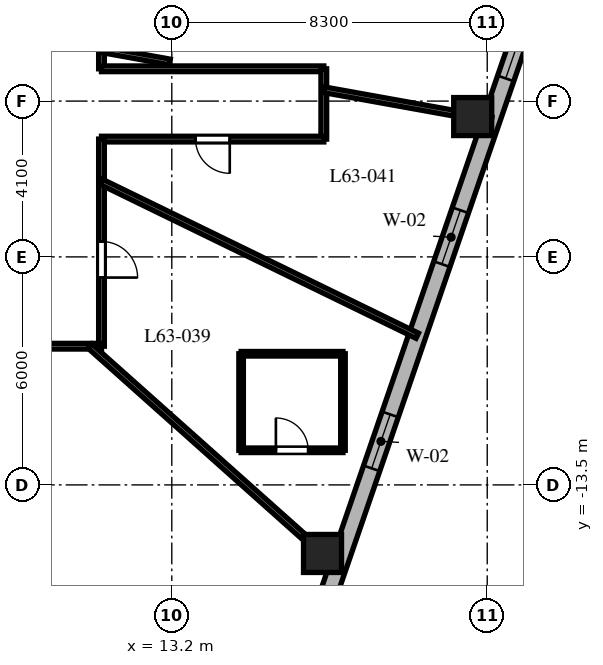
"""IFC4 building model, lengths in metres.
Left out: names, types, materials, properties, quantities, classifications, styles, units other than length and angle.
Written with IfcOpenShell. Run it as: python <this file> out.ifc"""

import sys

from ifc_helpers import new_model, si_unit, direction, frame, frame_2d, origin, origin_2d, place, context, subcontext, project, spatial, rectangle, extrude, element, fill, save


model = new_model("IFC4")
c1 = context("Model", 3, precision=1e-05, world=origin(), true_north=direction((0.0, 1.0)))
c2 = subcontext(c1, "Body", "Model", "MODEL_VIEW")
j1 = project(units=[si_unit("LENGTHUNIT", "METRE"), si_unit("PLANEANGLEUNIT", "RADIAN")], contexts=[c1])
p1 = place(None, origin())
s1 = spatial("IfcSite", under=j1, at=p1, CompositionType="ELEMENT")
p2 = place(p1, origin())
s2 = spatial("IfcBuilding", under=s1, at=p2, CompositionType="ELEMENT")
p3 = place(p2, frame((0.0, 0.0, 252.1)))
s3 = spatial("IfcBuildingStorey", under=s2, at=p3, CompositionType="ELEMENT", Elevation=252.1)
for number, where, z_axis, x_axis in (
    (1, (17.166, -15.304, 0.0), (0.0, 0.0, 1.0), (1.0, 0.0, 0.0)),
    (2, (21.118, -3.807, 0.0), (0.0, 0.0, 1.0), (1.0, 0.0, 0.0)),
):
    element("IfcColumn", number, at=place(p3, frame(where, z_axis=z_axis, x_axis=x_axis)), inside=s3, PredefinedType="COLUMN", context=c2, shape_type="SweptSolid", body=[
        extrude(rectangle(XDim=1.0, YDim=1.0, at=origin_2d()), origin(), (0.0, 0.0, 1.0), 3.8),
    ])
p4 = place(p3, frame((16.324, -19.275, 0.0), z_axis=(0.0, 0.0, 1.0), x_axis=(0.325083142304, 0.945685439557, 0.0)))
e3 = element("IfcWall", 3, at=p4, inside=s3, PredefinedType="SOLIDWALL", context=c2, shape_type="SweptSolid", body=[
    extrude(rectangle(XDim=20.224, YDim=0.45, at=frame_2d((10.112, 0.0))), origin(), (0.0, 0.0, 1.0), 3.48),
])
p5 = place(p4, frame((1.253, 0.0, 0.8)))
e4 = element("IfcOpeningElement", 4, at=p5, cuts=e3, PredefinedType="OPENING", context=c2, shape_type="SweptSolid", body=[
    extrude(rectangle(XDim=1.5, YDim=1.8, at=frame_2d((0.75, 0.9))), frame((0.0, 0.235, 0.0), z_axis=(0.0, -1.0, 0.0), x_axis=(1.0, 0.0, 0.0)), (0.0, 0.0, 1.0), 0.47),
])
p6 = place(p4, frame((6.568, 0.0, 0.8)))
e5 = element("IfcOpeningElement", 5, at=p6, cuts=e3, PredefinedType="OPENING", context=c2, shape_type="SweptSolid", body=[
    extrude(rectangle(XDim=1.5, YDim=1.8, at=frame_2d((0.75, 0.9))), frame((0.0, 0.235, 0.0), z_axis=(0.0, -1.0, 0.0), x_axis=(1.0, 0.0, 0.0)), (0.0, 0.0, 1.0), 0.47),
])
p7 = place(p4, frame((12.25, 0.0, 0.8)))
e6 = element("IfcOpeningElement", 6, at=p7, cuts=e3, PredefinedType="OPENING", context=c2, shape_type="SweptSolid", body=[
    extrude(rectangle(XDim=1.5, YDim=1.8, at=frame_2d((0.75, 0.9))), frame((0.0, 0.235, 0.0), z_axis=(0.0, -1.0, 0.0), x_axis=(1.0, 0.0, 0.0)), (0.0, 0.0, 1.0), 0.47),
])
p8 = place(p4, frame((17.418, 0.0, 0.8)))
e7 = element("IfcOpeningElement", 7, at=p8, cuts=e3, PredefinedType="OPENING", context=c2, shape_type="SweptSolid", body=[
    extrude(rectangle(XDim=1.5, YDim=1.8, at=frame_2d((0.75, 0.9))), frame((0.0, 0.235, 0.0), z_axis=(0.0, -1.0, 0.0), x_axis=(1.0, 0.0, 0.0)), (0.0, 0.0, 1.0), 0.47),
])
p9 = place(p3, frame((11.35, 9.85, 0.0), z_axis=(0.0, 0.0, 1.0), x_axis=(0.0, -1.0, 0.0)))
e8 = element("IfcWall", 8, at=p9, inside=s3, PredefinedType="PARTITIONING", context=c2, shape_type="SweptSolid", body=[
    extrude(rectangle(XDim=12.4, YDim=0.15, at=frame_2d((6.2, 0.0))), origin(), (0.0, 0.0, 1.0), 2.97),
])
p10 = place(p9, frame((4.709, 0.0, 0.0)))
e9 = element("IfcOpeningElement", 9, at=p10, cuts=e8, PredefinedType="OPENING", context=c2, shape_type="SweptSolid", body=[
    extrude(rectangle(XDim=0.9, YDim=2.03, at=frame_2d((0.45, 1.015))), frame((0.0, 0.085, 0.0), z_axis=(0.0, -1.0, 0.0), x_axis=(1.0, 0.0, 0.0)), (0.0, 0.0, 1.0), 0.17),
])
p11 = place(p9, frame((1.457, 0.0, 0.0)))
e10 = element("IfcOpeningElement", 10, at=p11, cuts=e8, PredefinedType="OPENING", context=c2, shape_type="SweptSolid", body=[
    extrude(rectangle(XDim=0.95, YDim=2.03, at=frame_2d((0.475, 1.015))), frame((0.0, 0.085, 0.0), z_axis=(0.0, -1.0, 0.0), x_axis=(1.0, 0.0, 0.0)), (0.0, 0.0, 1.0), 0.17),
])
p12 = place(p9, frame((8.835, 0.0, 0.0)))
e11 = element("IfcOpeningElement", 11, at=p12, cuts=e8, PredefinedType="OPENING", context=c2, shape_type="SweptSolid", body=[
    extrude(rectangle(XDim=0.95, YDim=2.03, at=frame_2d((0.475, 1.015))), frame((0.0, 0.085, 0.0), z_axis=(0.0, -1.0, 0.0), x_axis=(1.0, 0.0, 0.0)), (0.0, 0.0, 1.0), 0.17),
])
p13 = place(p3, frame((11.35, -2.55, 0.0), z_axis=(0.0, 0.0, 1.0), x_axis=(1.0, 0.0, 0.0)))
e12 = element("IfcWall", 12, at=p13, inside=s3, PredefinedType="PARTITIONING", context=c2, shape_type="SweptSolid", body=[
    extrude(rectangle(XDim=5.85, YDim=0.15, at=frame_2d((2.925, 0.0))), origin(), (0.0, 0.0, 1.0), 2.92),
])
p14 = place(p3, frame((17.2, -2.55, 0.0), z_axis=(0.0, 0.0, 1.0), x_axis=(0.0, -1.0, 0.0)))
e13 = element("IfcWall", 13, at=p14, inside=s3, PredefinedType="PARTITIONING", context=c2, shape_type="SweptSolid", body=[
    extrude(rectangle(XDim=1.85, YDim=0.15, at=frame_2d((0.925, 0.0))), origin(), (0.0, 0.0, 1.0), 2.92),
])
p15 = place(p3, frame((17.2, -4.4, 0.0), z_axis=(0.0, 0.0, 1.0), x_axis=(-1.0, 0.0, 0.0)))
e14 = element("IfcWall", 14, at=p15, inside=s3, PredefinedType="PARTITIONING", context=c2, shape_type="SweptSolid", body=[
    extrude(rectangle(XDim=5.85, YDim=0.15, at=frame_2d((2.925, 0.0))), origin(), (0.0, 0.0, 1.0), 2.92),
])
p16 = place(p15, frame((2.475, 0.0, 0.0)))
e15 = element("IfcOpeningElement", 15, at=p16, cuts=e14, PredefinedType="OPENING", context=c2, shape_type="SweptSolid", body=[
    extrude(rectangle(XDim=0.9, YDim=2.03, at=frame_2d((0.45, 1.015))), frame((0.0, 0.085, 0.0), z_axis=(0.0, -1.0, 0.0), x_axis=(1.0, 0.0, 0.0)), (0.0, 0.0, 1.0), 0.17),
])
p17 = place(p3, frame((11.35, -4.4, 0.0), z_axis=(0.0, 0.0, 1.0), x_axis=(0.0, -1.0, 0.0)))
e16 = element("IfcWall", 16, at=p17, inside=s3, PredefinedType="PARTITIONING", context=c2, shape_type="SweptSolid", body=[
    extrude(rectangle(XDim=5.45, YDim=0.15, at=frame_2d((2.725, 0.0))), origin(), (0.0, 0.0, 1.0), 2.97),
])
p18 = place(p17, frame((2.694, 0.0, 0.0)))
e17 = element("IfcOpeningElement", 17, at=p18, cuts=e16, PredefinedType="OPENING", context=c2, shape_type="SweptSolid", body=[
    extrude(rectangle(XDim=0.95, YDim=2.03, at=frame_2d((0.475, 1.015))), frame((0.0, 0.085, 0.0), z_axis=(0.0, -1.0, 0.0), x_axis=(1.0, 0.0, 0.0)), (0.0, 0.0, 1.0), 0.17),
])
p19 = place(p3, frame((11.35, -9.85, 0.0), z_axis=(0.0, 0.0, 1.0), x_axis=(-1.0, 0.0, 0.0)))
e18 = element("IfcWall", 18, at=p19, inside=s3, PredefinedType="PARTITIONING", context=c2, shape_type="SweptSolid", body=[
    extrude(rectangle(XDim=10.43, YDim=0.15, at=frame_2d((5.215, 0.0))), origin(), (0.0, 0.0, 1.0), 2.97),
])
p20 = place(p19, frame((8.362, 0.0, 0.0)))
e19 = element("IfcOpeningElement", 19, at=p20, cuts=e18, PredefinedType="OPENING", context=c2, shape_type="SweptSolid", body=[
    extrude(rectangle(XDim=0.95, YDim=2.03, at=frame_2d((0.475, 1.015))), frame((0.0, 0.085, 0.0), z_axis=(0.0, -1.0, 0.0), x_axis=(1.0, 0.0, 0.0)), (0.0, 0.0, 1.0), 0.17),
])
p21 = place(p19, frame((3.396, 0.0, 0.0)))
e20 = element("IfcOpeningElement", 20, at=p21, cuts=e18, PredefinedType="OPENING", context=c2, shape_type="SweptSolid", body=[
    extrude(rectangle(XDim=0.95, YDim=2.03, at=frame_2d((0.475, 1.015))), frame((0.0, 0.085, 0.0), z_axis=(0.0, -1.0, 0.0), x_axis=(1.0, 0.0, 0.0)), (0.0, 0.0, 1.0), 0.17),
])
p22 = place(p3, frame((11.048, -9.85, 0.0), z_axis=(0.0, 0.0, 1.0), x_axis=(0.746444434655, -0.665447748492, 0.0)))
e21 = element("IfcWall", 21, at=p22, inside=s3, PredefinedType="PARTITIONING", context=c2, shape_type="SweptSolid", body=[
    extrude(rectangle(XDim=8.732, YDim=0.15, at=frame_2d((4.366, 0.0))), origin(), (0.0, 0.0, 1.0), 2.72),
])
p23 = place(p3, frame((11.35, -5.528, 0.0), z_axis=(0.0, 0.0, 1.0), x_axis=(0.899038669565, -0.437869239188, 0.0)))
e22 = element("IfcWall", 22, at=p23, inside=s3, PredefinedType="PARTITIONING", context=c2, shape_type="SweptSolid", body=[
    extrude(rectangle(XDim=9.242, YDim=0.15, at=frame_2d((4.621, 0.0))), origin(), (0.0, 0.0, 1.0), 2.72),
])
p24 = place(p3, frame((11.35, -2.046, 0.0), z_axis=(0.0, 0.0, 1.0), x_axis=(0.984127783205, -0.177461281195, 0.0)))
e23 = element("IfcWall", 23, at=p24, inside=s3, PredefinedType="PARTITIONING", context=c2, shape_type="SweptSolid", body=[
    extrude(rectangle(XDim=1.826, YDim=0.15, at=frame_2d((0.913, 0.0))), origin(), (0.0, 0.0, 1.0), 3.48),
])
p25 = place(p3, frame((17.2, -3.101, 0.0), z_axis=(0.0, 0.0, 1.0), x_axis=(0.98413465883, -0.177423147559, 0.0)))
e24 = element("IfcWall", 24, at=p25, inside=s3, PredefinedType="PARTITIONING", context=c2, shape_type="SweptSolid", body=[
    extrude(rectangle(XDim=4.482, YDim=0.15, at=frame_2d((2.241, 0.0))), origin(), (0.0, 0.0, 1.0), 2.72),
])
p26 = place(p3, frame((15.024, -12.589, 0.0), z_axis=(0.0, 0.0, 1.0), x_axis=(1.0, 0.0, 0.0)))
e25 = element("IfcWall", 25, at=p26, inside=s3, PredefinedType="PARTITIONING", context=c2, shape_type="SweptSolid", body=[
    extrude(rectangle(XDim=2.68, YDim=0.12, at=frame_2d((1.34, 0.0))), origin(), (0.0, 0.0, 1.0), 3.48),
])
p27 = place(p26, frame((0.915, 0.0, 0.0)))
e26 = element("IfcOpeningElement", 26, at=p27, cuts=e25, PredefinedType="OPENING", context=c2, shape_type="SweptSolid", body=[
    extrude(rectangle(XDim=0.85, YDim=2.03, at=frame_2d((0.425, 1.015))), frame((0.0, 0.07, 0.0), z_axis=(0.0, -1.0, 0.0), x_axis=(1.0, 0.0, 0.0)), (0.0, 0.0, 1.0), 0.14),
])
p28 = place(p3, frame((17.704, -12.589, 0.0), z_axis=(0.0, 0.0, 1.0), x_axis=(0.0, 1.0, 0.0)))
e27 = element("IfcWall", 27, at=p28, inside=s3, PredefinedType="PARTITIONING", context=c2, shape_type="SweptSolid", body=[
    extrude(rectangle(XDim=2.54, YDim=0.12, at=frame_2d((1.27, 0.0))), origin(), (0.0, 0.0, 1.0), 3.48),
])
p29 = place(p3, frame((17.704, -10.049, 0.0), z_axis=(0.0, 0.0, 1.0), x_axis=(-1.0, 0.0, 0.0)))
e28 = element("IfcWall", 28, at=p29, inside=s3, PredefinedType="PARTITIONING", context=c2, shape_type="SweptSolid", body=[
    extrude(rectangle(XDim=2.68, YDim=0.12, at=frame_2d((1.34, 0.0))), origin(), (0.0, 0.0, 1.0), 3.052),
])
p30 = place(p3, frame((15.024, -10.049, 0.0), z_axis=(0.0, 0.0, 1.0), x_axis=(0.0, -1.0, 0.0)))
e29 = element("IfcWall", 29, at=p30, inside=s3, PredefinedType="PARTITIONING", context=c2, shape_type="SweptSolid", body=[
    extrude(rectangle(XDim=2.54, YDim=0.12, at=frame_2d((1.27, 0.0))), origin(), (0.0, 0.0, 1.0), 3.052),
])
p31 = place(p6, origin())
e30 = element("IfcWindow", 30, at=p31, inside=s3, PartitioningType="SINGLE_PANEL", PredefinedType="WINDOW", context=c2, shape_type="SweptSolid", body=[
    extrude(rectangle(XDim=1.5, YDim=1.8, at=frame_2d((0.75, 0.9))), frame((0.0, 0.03, 0.0), z_axis=(0.0, -1.0, 0.0), x_axis=(1.0, 0.0, 0.0)), (0.0, 0.0, 1.0), 0.06),
])
fill(e5, e30)
p32 = place(p7, origin())
e31 = element("IfcWindow", 31, at=p32, inside=s3, PartitioningType="SINGLE_PANEL", PredefinedType="WINDOW", context=c2, shape_type="SweptSolid", body=[
    extrude(rectangle(XDim=1.5, YDim=1.8, at=frame_2d((0.75, 0.9))), frame((0.0, 0.03, 0.0), z_axis=(0.0, -1.0, 0.0), x_axis=(1.0, 0.0, 0.0)), (0.0, 0.0, 1.0), 0.06),
])
fill(e6, e31)
p33 = place(p8, origin())
e32 = element("IfcWindow", 32, at=p33, inside=s3, PartitioningType="SINGLE_PANEL", PredefinedType="WINDOW", context=c2, shape_type="SweptSolid", body=[
    extrude(rectangle(XDim=1.5, YDim=1.8, at=frame_2d((0.75, 0.9))), frame((0.0, 0.03, 0.0), z_axis=(0.0, -1.0, 0.0), x_axis=(1.0, 0.0, 0.0)), (0.0, 0.0, 1.0), 0.06),
])
fill(e7, e32)
p34 = place(p18, origin())
e33 = element("IfcDoor", 33, at=p34, inside=s3, OperationType="SINGLE_SWING_RIGHT", PredefinedType="DOOR", context=c2, shape_type="SweptSolid", body=[
    extrude(rectangle(XDim=0.95, YDim=2.03, at=frame_2d((0.475, 1.015))), frame((0.0, 0.025, 0.0), z_axis=(0.0, -1.0, 0.0), x_axis=(1.0, 0.0, 0.0)), (0.0, 0.0, 1.0), 0.05),
])
fill(e17, e33)
p35 = place(p27, origin())
e34 = element("IfcDoor", 34, at=p35, inside=s3, OperationType="SINGLE_SWING_LEFT", PredefinedType="DOOR", context=c2, shape_type="SweptSolid", body=[
    extrude(rectangle(XDim=0.85, YDim=2.03, at=frame_2d((0.425, 1.015))), frame((0.0, 0.025, 0.0), z_axis=(0.0, -1.0, 0.0), x_axis=(1.0, 0.0, 0.0)), (0.0, 0.0, 1.0), 0.05),
])
fill(e26, e34)
p36 = place(p16, origin())
e35 = element("IfcDoor", 35, at=p36, inside=s3, OperationType="SINGLE_SWING_LEFT", PredefinedType="DOOR", context=c2, shape_type="SweptSolid", body=[
    extrude(rectangle(XDim=0.9, YDim=2.03, at=frame_2d((0.45, 1.015))), frame((0.0, 0.025, 0.0), z_axis=(0.0, -1.0, 0.0), x_axis=(1.0, 0.0, 0.0)), (0.0, 0.0, 1.0), 0.05),
])
fill(e15, e35)
save(model, sys.argv[1])
